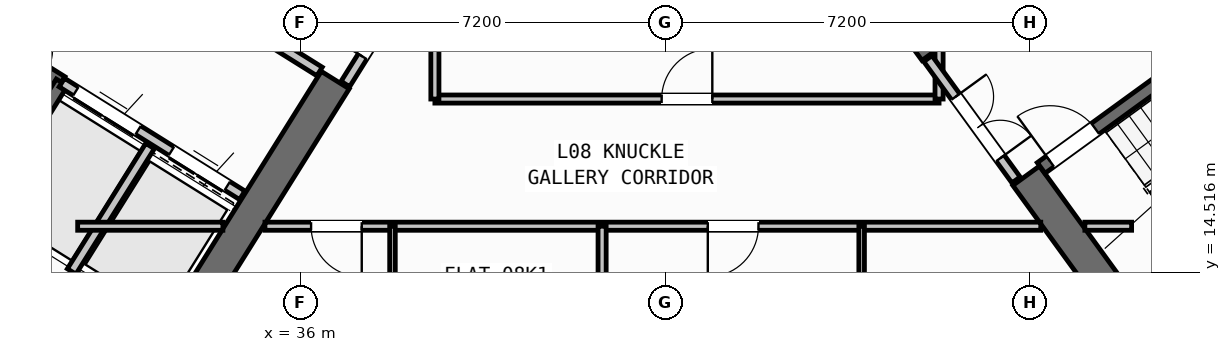
"""IFC4 building model, lengths in metres.
Left out: names, types, materials, properties, quantities, classifications, styles, units other than length and angle.
Written with IfcOpenShell. Run it as: python <this file> out.ifc"""

import sys

from ifc_helpers import new_model, si_unit, direction, frame, frame_2d, origin, place, context, subcontext, project, spatial, rectangle, extrude, source, transform, mapped, element, fill, save


model = new_model("IFC4")
c1 = context("Model", 3, precision=1e-05, world=origin(), true_north=direction((0.0, 1.0)))
c2 = subcontext(c1, "Body", "Model", "MODEL_VIEW")
j1 = project(units=[si_unit("LENGTHUNIT", "METRE"), si_unit("PLANEANGLEUNIT", "RADIAN")], contexts=[c1])
p1 = place(None, origin())
s1 = spatial("IfcSite", under=j1, at=p1, CompositionType="ELEMENT")
p2 = place(p1, origin())
s2 = spatial("IfcBuilding", under=s1, at=p2, CompositionType="ELEMENT")
p3 = place(p2, frame((0.0, 0.0, 34.8)))
s3 = spatial("IfcBuildingStorey", under=s2, at=p3, CompositionType="ELEMENT", Elevation=34.8)
p4 = place(p3, frame((33.409, 12.45, 0.0), z_axis=(0.0, 0.0, 1.0), x_axis=(-0.848051132073, 0.529914405721, 0.0)))
e1 = element("IfcWall", 1, at=p4, inside=s3, PredefinedType="SHEAR", context=c2, shape_type="SweptSolid", body=[
    extrude(rectangle(XDim=13.24, YDim=0.65, at=frame_2d((6.62, 0.0))), origin(), (0.0, 0.0, 1.0), 3.35),
])
p5 = place(p3, frame((36.683, 18.304, 0.0), z_axis=(0.0, 0.0, 1.0), x_axis=(-0.529899109053, -0.848060690178, 0.0)))
e2 = element("IfcWall", 2, at=p5, inside=s3, PredefinedType="SHEAR", context=c2, shape_type="SweptSolid", body=[
    extrude(rectangle(XDim=6.375, YDim=0.65, at=frame_2d((3.188, 0.0))), origin(), (0.0, 0.0, 1.0), 3.35),
])
p6 = place(p3, frame((52.318, 13.11, 0.0), z_axis=(0.0, 0.0, 1.0), x_axis=(0.809019445368, 0.587781878776, 0.0)))
e3 = element("IfcWall", 3, at=p6, inside=s3, PredefinedType="SHEAR", context=c2, shape_type="SweptSolid", body=[
    extrude(rectangle(XDim=12.44, YDim=0.65, at=frame_2d((6.22, 0.0))), origin(), (0.0, 0.0, 1.0), 3.35),
])
p7 = place(p3, frame((52.39, 13.564, 0.0), z_axis=(0.0, 0.0, 1.0), x_axis=(-0.58779688989, 0.809008539037, 0.0)))
e4 = element("IfcWall", 4, at=p7, inside=s3, PredefinedType="SHEAR", context=c2, shape_type="SweptSolid", body=[
    extrude(rectangle(XDim=3.525, YDim=0.65, at=frame_2d((1.763, 0.0))), origin(), (0.0, 0.0, 1.0), 3.35),
])
p8 = place(p3, frame((48.526, 18.884, 0.0), z_axis=(0.0, 0.0, 1.0), x_axis=(-0.58777996584, 0.809020835181, 0.0)))
e5 = element("IfcWall", 5, at=p8, inside=s3, PredefinedType="SHEAR", context=c2, shape_type="SweptSolid", body=[
    extrude(rectangle(XDim=6.375, YDim=0.65, at=frame_2d((3.188, 0.0))), origin(), (0.0, 0.0, 1.0), 3.35),
])
p9 = place(p3, frame((31.28, 18.261, 0.0), z_axis=(0.0, 0.0, 1.0), x_axis=(-0.848051618787, 0.529913626805, 0.0)))
e6 = element("IfcWall", 6, at=p9, inside=s3, PredefinedType="SHEAR", context=c2, shape_type="SweptSolid", body=[
    extrude(rectangle(XDim=7.46, YDim=0.26, at=frame_2d((3.73, 0.0))), origin(), (0.0, 0.0, 1.0), 3.35),
])
p10 = place(p9, frame((0.36, 0.0, 0.0)))
e7 = element("IfcOpeningElement", 7, at=p10, cuts=e6, PredefinedType="OPENING", context=c2, shape_type="SweptSolid", body=[
    extrude(rectangle(XDim=0.86, YDim=2.05, at=frame_2d((0.43, 1.025))), frame((0.0, 0.14, 0.0), z_axis=(0.0, -1.0, 0.0), x_axis=(1.0, 0.0, 0.0)), (0.0, 0.0, 1.0), 0.28),
])
p11 = place(p3, frame((31.288, 18.256, 0.0), z_axis=(0.0, 0.0, 1.0), x_axis=(-0.529943379326, -0.848033026897, 0.0)))
e8 = element("IfcWall", 8, at=p11, inside=s3, PredefinedType="SHEAR", context=c2, shape_type="SweptSolid", body=[
    extrude(rectangle(XDim=3.16, YDim=0.26, at=frame_2d((1.58, 0.0))), origin(), (0.0, 0.0, 1.0), 3.35),
])
p12 = place(p3, frame((34.848, 16.031, 0.0), z_axis=(0.0, 0.0, 1.0), x_axis=(-0.848044042236, 0.529925751807, 0.0)))
e9 = element("IfcWall", 9, at=p12, inside=s3, PredefinedType="STANDARD", context=c2, shape_type="SweptSolid", body=[
    extrude(rectangle(XDim=4.198, YDim=0.2, at=frame_2d((2.099, 0.0))), origin(), (0.0, 0.0, 1.0), 3.34),
])
p13 = place(p12, frame((0.348, 0.0, 0.0)))
e10 = element("IfcOpeningElement", 10, at=p13, cuts=e9, PredefinedType="OPENING", context=c2, shape_type="SweptSolid", body=[
    extrude(rectangle(XDim=1.3, YDim=2.2, at=frame_2d((0.65, 1.1))), frame((0.0, 0.11, 0.0), z_axis=(0.0, -1.0, 0.0), x_axis=(1.0, 0.0, 0.0)), (0.0, 0.0, 1.0), 0.22),
])
p14 = place(p12, frame((2.423, 0.0, 0.0)))
e11 = element("IfcOpeningElement", 11, at=p14, cuts=e9, PredefinedType="OPENING", context=c2, shape_type="SweptSolid", body=[
    extrude(rectangle(XDim=1.45, YDim=2.25, at=frame_2d((0.725, 1.125))), frame((0.0, 0.11, 0.0), z_axis=(0.0, -1.0, 0.0), x_axis=(1.0, 0.0, 0.0)), (0.0, 0.0, 1.0), 0.22),
])
p15 = place(p3, frame((36.374, 18.474, 0.0), z_axis=(0.0, 0.0, 1.0), x_axis=(-0.848051071577, 0.529914502535, 0.0)))
e12 = element("IfcWall", 12, at=p15, inside=s3, PredefinedType="STANDARD", context=c2, shape_type="SweptSolid", body=[
    extrude(rectangle(XDim=5.718, YDim=0.2, at=frame_2d((2.859, 0.0))), origin(), (0.0, 0.0, 1.0), 3.34),
])
p16 = place(p15, frame((2.498, 0.0, 0.0)))
e13 = element("IfcOpeningElement", 13, at=p16, cuts=e12, PredefinedType="OPENING", context=c2, shape_type="SweptSolid", body=[
    extrude(rectangle(XDim=1.15, YDim=2.1, at=frame_2d((0.575, 1.05))), frame((0.0, 0.11, 0.0), z_axis=(0.0, -1.0, 0.0), x_axis=(1.0, 0.0, 0.0)), (0.0, 0.0, 1.0), 0.22),
])
p17 = place(p3, frame((33.029, 17.003, 0.0), z_axis=(0.0, 0.0, 1.0), x_axis=(-0.529916267533, -0.848049968695, 0.0)))
e14 = element("IfcWall", 14, at=p17, inside=s3, PredefinedType="STANDARD", context=c2, shape_type="SweptSolid", body=[
    extrude(rectangle(XDim=2.92, YDim=0.2, at=frame_2d((1.46, 0.0))), origin(), (0.0, 0.0, 1.0), 3.34),
])
p18 = place(p3, frame((52.472, 14.013, 0.0), z_axis=(0.0, 0.0, 1.0), x_axis=(0.809028366311, 0.587769599847, 0.0)))
e15 = element("IfcWall", 15, at=p18, inside=s3, PredefinedType="SHEAR", context=c2, shape_type="SweptSolid", body=[
    extrude(rectangle(XDim=7.33, YDim=0.26, at=frame_2d((3.665, 0.0))), origin(), (0.0, 0.0, 1.0), 3.35),
])
p19 = place(p3, frame((50.615, 16.57, 0.0), z_axis=(0.0, 0.0, 1.0), x_axis=(0.809028366311, 0.587769599847, 0.0)))
e16 = element("IfcWall", 16, at=p19, inside=s3, PredefinedType="SHEAR", context=c2, shape_type="SweptSolid", body=[
    extrude(rectangle(XDim=7.33, YDim=0.26, at=frame_2d((3.665, 0.0))), origin(), (0.0, 0.0, 1.0), 3.35),
])
p20 = place(p19, frame((0.22, 0.0, 0.0)))
e17 = element("IfcOpeningElement", 17, at=p20, cuts=e16, PredefinedType="OPENING", context=c2, shape_type="SweptSolid", body=[
    extrude(rectangle(XDim=1.1, YDim=2.1, at=frame_2d((0.55, 1.05))), frame((0.0, 0.14, 0.0), z_axis=(0.0, -1.0, 0.0), x_axis=(1.0, 0.0, 0.0)), (0.0, 0.0, 1.0), 0.28),
])
p21 = place(p3, frame((32.164, 10.374, 0.0), z_axis=(0.0, 0.0, 1.0), x_axis=(-0.848044107957, 0.529925646633, 0.0)))
e18 = element("IfcWall", 18, at=p21, inside=s3, PredefinedType="PARTITIONING", context=c2, shape_type="SweptSolid", body=[
    extrude(rectangle(XDim=15.57, YDim=0.16, at=frame_2d((7.785, 0.0))), origin(), (0.0, 0.0, 1.0), 3.34),
])
p22 = place(p21, frame((10.83, 0.0, 0.0)))
e19 = element("IfcOpeningElement", 19, at=p22, cuts=e18, PredefinedType="OPENING", context=c2, shape_type="SweptSolid", body=[
    extrude(rectangle(XDim=1.0, YDim=2.1, at=frame_2d((0.5, 1.05))), frame((0.0, 0.09, 0.0), z_axis=(0.0, -1.0, 0.0), x_axis=(1.0, 0.0, 0.0)), (0.0, 0.0, 1.0), 0.18),
])
p23 = place(p3, frame((38.451, 20.737, 0.0), z_axis=(0.0, 0.0, 1.0), x_axis=(-0.529924799939, -0.848044637038, 0.0)))
e20 = element("IfcWall", 20, at=p23, inside=s3, PredefinedType="STANDARD", context=c2, shape_type="SweptSolid", body=[
    extrude(rectangle(XDim=2.96, YDim=0.2, at=frame_2d((1.48, 0.0))), origin(), (0.0, 0.0, 1.0), 3.34),
])
p24 = place(p23, frame((1.46, 0.0, 0.0)))
e21 = element("IfcOpeningElement", 21, at=p24, cuts=e20, PredefinedType="OPENING", context=c2, shape_type="SweptSolid", body=[
    extrude(rectangle(XDim=0.86, YDim=2.05, at=frame_2d((0.43, 1.025))), frame((0.0, 0.11, 0.0), z_axis=(0.0, -1.0, 0.0), x_axis=(1.0, 0.0, 0.0)), (0.0, 0.0, 1.0), 0.22),
])
p25 = place(p3, frame((31.6, 15.42, 0.0), z_axis=(0.0, 0.0, 1.0), x_axis=(1.0, 0.0, 0.0)))
e22 = element("IfcWall", 22, at=p25, inside=s3, PredefinedType="PARTITIONING", context=c2, shape_type="SweptSolid", body=[
    extrude(rectangle(XDim=2.866, YDim=0.16, at=frame_2d((1.433, 0.0))), origin(), (0.0, 0.0, 1.0), 3.34),
])
p26 = place(p3, frame((35.296, 15.42, 0.0), z_axis=(0.0, 0.0, 1.0), x_axis=(1.0, 0.0, 0.0)))
e23 = element("IfcWall", 23, at=p26, inside=s3, PredefinedType="PARTITIONING", context=c2, shape_type="SweptSolid", body=[
    extrude(rectangle(XDim=15.311, YDim=0.16, at=frame_2d((7.655, 0.0))), origin(), (0.0, 0.0, 1.0), 3.34),
])
p27 = place(p26, frame((0.91, 0.0, 0.0)))
e24 = element("IfcOpeningElement", 24, at=p27, cuts=e23, PredefinedType="OPENING", context=c2, shape_type="SweptSolid", body=[
    extrude(rectangle(XDim=1.0, YDim=2.1, at=frame_2d((0.5, 1.05))), frame((0.0, 0.09, 0.0), z_axis=(0.0, -1.0, 0.0), x_axis=(1.0, 0.0, 0.0)), (0.0, 0.0, 1.0), 0.18),
])
p28 = place(p26, frame((8.74, 0.0, 0.0)))
e25 = element("IfcOpeningElement", 25, at=p28, cuts=e23, PredefinedType="OPENING", context=c2, shape_type="SweptSolid", body=[
    extrude(rectangle(XDim=1.0, YDim=2.1, at=frame_2d((0.5, 1.05))), frame((0.0, 0.09, 0.0), z_axis=(0.0, -1.0, 0.0), x_axis=(1.0, 0.0, 0.0)), (0.0, 0.0, 1.0), 0.18),
])
p29 = place(p3, frame((51.477, 15.42, 0.0), z_axis=(0.0, 0.0, 1.0), x_axis=(1.0, 0.0, 0.0)))
e26 = element("IfcWall", 26, at=p29, inside=s3, PredefinedType="PARTITIONING", context=c2, shape_type="SweptSolid", body=[
    extrude(rectangle(XDim=0.923, YDim=0.16, at=frame_2d((0.461, 0.0))), origin(), (0.0, 0.0, 1.0), 3.34),
])
p30 = place(p3, frame((38.65, 17.93, 0.0), z_axis=(0.0, 0.0, 1.0), x_axis=(1.0, 0.0, 0.0)))
e27 = element("IfcWall", 27, at=p30, inside=s3, PredefinedType="PARTITIONING", context=c2, shape_type="SweptSolid", body=[
    extrude(rectangle(XDim=9.95, YDim=0.16, at=frame_2d((4.975, 0.0))), origin(), (0.0, 0.0, 1.0), 3.34),
])
p31 = place(p30, frame((4.475, 0.0, 0.0)))
e28 = element("IfcOpeningElement", 28, at=p31, cuts=e27, PredefinedType="OPENING", context=c2, shape_type="SweptSolid", body=[
    extrude(rectangle(XDim=1.0, YDim=2.1, at=frame_2d((0.5, 1.05))), frame((0.0, 0.09, 0.0), z_axis=(0.0, -1.0, 0.0), x_axis=(1.0, 0.0, 0.0)), (0.0, 0.0, 1.0), 0.18),
])
p32 = place(p3, frame((38.65, 17.93, 0.0), z_axis=(0.0, 0.0, 1.0), x_axis=(0.0, 1.0, 0.0)))
e29 = element("IfcWall", 29, at=p32, inside=s3, PredefinedType="PARTITIONING", context=c2, shape_type="SweptSolid", body=[
    extrude(rectangle(XDim=2.857, YDim=0.16, at=frame_2d((1.428, 0.0))), origin(), (0.0, 0.0, 1.0), 3.34),
])
p33 = place(p3, frame((48.6, 17.93, 0.0), z_axis=(0.0, 0.0, 1.0), x_axis=(0.0, 1.0, 0.0)))
e30 = element("IfcWall", 30, at=p33, inside=s3, PredefinedType="PARTITIONING", context=c2, shape_type="SweptSolid", body=[
    extrude(rectangle(XDim=0.993, YDim=0.16, at=frame_2d((0.496, 0.0))), origin(), (0.0, 0.0, 1.0), 3.34),
])
p34 = place(p3, frame((50.119, 16.333, 0.0), z_axis=(0.0, 0.0, 1.0), x_axis=(-0.587749856981, 0.809042709391, 0.0)))
e31 = element("IfcWall", 31, at=p34, inside=s3, PredefinedType="STANDARD", context=c2, shape_type="SweptSolid", body=[
    extrude(rectangle(XDim=2.96, YDim=0.2, at=frame_2d((1.48, 0.0))), origin(), (0.0, 0.0, 1.0), 3.34),
])
p35 = place(p34, frame((0.53, 0.0, 0.0)))
e32 = element("IfcOpeningElement", 32, at=p35, cuts=e31, PredefinedType="OPENING", context=c2, shape_type="SweptSolid", body=[
    extrude(rectangle(XDim=1.5, YDim=2.15, at=frame_2d((0.75, 1.075))), frame((0.0, 0.11, 0.0), z_axis=(0.0, -1.0, 0.0), x_axis=(1.0, 0.0, 0.0)), (0.0, 0.0, 1.0), 0.22),
])
p36 = place(p3, frame((41.95, 1.96, 0.0), z_axis=(0.0, 0.0, 1.0), x_axis=(0.0, 1.0, 0.0)))
e33 = element("IfcWall", 33, at=p36, inside=s3, PredefinedType="PARTITIONING", context=c2, shape_type="SweptSolid", body=[
    extrude(rectangle(XDim=13.46, YDim=0.16, at=frame_2d((6.73, 0.0))), origin(), (0.0, 0.0, 1.0), 3.34),
])
p37 = place(p3, frame((37.813, 1.96, 0.0), z_axis=(0.0, 0.0, 1.0), x_axis=(0.0, 1.0, 0.0)))
e34 = element("IfcWall", 34, at=p37, inside=s3, PredefinedType="PARTITIONING", context=c2, shape_type="SweptSolid", body=[
    extrude(rectangle(XDim=13.46, YDim=0.11, at=frame_2d((6.73, 0.0))), origin(), (0.0, 0.0, 1.0), 3.34),
])
p38 = place(p37, frame((5.5, 0.0, 0.0)))
e35 = element("IfcOpeningElement", 35, at=p38, cuts=e34, PredefinedType="OPENING", context=c2, shape_type="SweptSolid", body=[
    extrude(rectangle(XDim=0.92, YDim=2.08, at=frame_2d((0.46, 1.04))), frame((0.0, 0.065, 0.0), z_axis=(0.0, -1.0, 0.0), x_axis=(1.0, 0.0, 0.0)), (0.0, 0.0, 1.0), 0.13),
])
p39 = place(p37, frame((10.67, 0.0, 0.0)))
e36 = element("IfcOpeningElement", 36, at=p39, cuts=e34, PredefinedType="OPENING", context=c2, shape_type="SweptSolid", body=[
    extrude(rectangle(XDim=0.88, YDim=2.08, at=frame_2d((0.44, 1.04))), frame((0.0, 0.065, 0.0), z_axis=(0.0, -1.0, 0.0), x_axis=(1.0, 0.0, 0.0)), (0.0, 0.0, 1.0), 0.13),
])
p40 = place(p3, frame((47.072, 1.96, 0.0), z_axis=(0.0, 0.0, 1.0), x_axis=(0.0, 1.0, 0.0)))
e37 = element("IfcWall", 37, at=p40, inside=s3, PredefinedType="PARTITIONING", context=c2, shape_type="SweptSolid", body=[
    extrude(rectangle(XDim=13.46, YDim=0.11, at=frame_2d((6.73, 0.0))), origin(), (0.0, 0.0, 1.0), 3.34),
])
p41 = place(p40, frame((6.6, 0.0, 0.0)))
e38 = element("IfcOpeningElement", 38, at=p41, cuts=e37, PredefinedType="OPENING", context=c2, shape_type="SweptSolid", body=[
    extrude(rectangle(XDim=0.92, YDim=2.08, at=frame_2d((0.46, 1.04))), frame((0.0, 0.065, 0.0), z_axis=(0.0, -1.0, 0.0), x_axis=(1.0, 0.0, 0.0)), (0.0, 0.0, 1.0), 0.13),
])
p42 = place(p40, frame((11.32, 0.0, 0.0)))
e39 = element("IfcOpeningElement", 39, at=p42, cuts=e37, PredefinedType="OPENING", context=c2, shape_type="SweptSolid", body=[
    extrude(rectangle(XDim=0.88, YDim=2.08, at=frame_2d((0.44, 1.04))), frame((0.0, 0.065, 0.0), z_axis=(0.0, -1.0, 0.0), x_axis=(1.0, 0.0, 0.0)), (0.0, 0.0, 1.0), 0.13),
])
m1 = source(origin(), c2, "Body", "SweptSolid", [
    extrude(rectangle(XDim=1.3, YDim=2.2, at=frame_2d((0.65, 1.1))), frame((0.0, 0.025, 0.0), z_axis=(0.0, -1.0, 0.0), x_axis=(1.0, 0.0, 0.0)), (0.0, 0.0, 1.0), 0.05),
])
p43 = place(p13, origin())
e40 = element("IfcDoor", 40, at=p43, inside=s3, OperationType="DOUBLE_DOOR_SLIDING", PredefinedType="DOOR", context=c2, shape_type="MappedRepresentation", body=[
    mapped(m1, transform((0.0, 0.0, 0.0), scale=1.0)),
])
fill(e10, e40)
m2 = source(origin(), c2, "Body", "SweptSolid", [
    extrude(rectangle(XDim=1.45, YDim=2.25, at=frame_2d((0.725, 1.125))), frame((0.0, 0.025, 0.0), z_axis=(0.0, -1.0, 0.0), x_axis=(1.0, 0.0, 0.0)), (0.0, 0.0, 1.0), 0.05),
])
p44 = place(p14, origin())
e41 = element("IfcDoor", 41, at=p44, inside=s3, OperationType="DOUBLE_DOOR_SLIDING", PredefinedType="DOOR", context=c2, shape_type="MappedRepresentation", body=[
    mapped(m2, transform((0.0, 0.0, 0.0), scale=1.0)),
])
fill(e11, e41)
m3 = source(origin(), c2, "Body", "SweptSolid", [
    extrude(rectangle(XDim=1.1, YDim=2.1, at=frame_2d((0.55, 1.05))), frame((0.0, 0.025, 0.0), z_axis=(0.0, -1.0, 0.0), x_axis=(1.0, 0.0, 0.0)), (0.0, 0.0, 1.0), 0.05),
])
p45 = place(p20, origin())
e42 = element("IfcDoor", 42, at=p45, inside=s3, OperationType="SINGLE_SWING_LEFT", PredefinedType="DOOR", context=c2, shape_type="MappedRepresentation", body=[
    mapped(m3, transform((0.0, 0.0, 0.0), scale=1.0)),
])
fill(e17, e42)
m4 = source(origin(), c2, "Body", "SweptSolid", [
    extrude(rectangle(XDim=1.0, YDim=2.1, at=frame_2d((0.5, 1.05))), frame((0.0, 0.025, 0.0), z_axis=(0.0, -1.0, 0.0), x_axis=(1.0, 0.0, 0.0)), (0.0, 0.0, 1.0), 0.05),
])
p46 = place(p31, origin())
e43 = element("IfcDoor", 43, at=p46, inside=s3, OperationType="SINGLE_SWING_RIGHT", PredefinedType="DOOR", context=c2, shape_type="MappedRepresentation", body=[
    mapped(m4, transform((0.0, 0.0, 0.0), scale=1.0)),
])
fill(e28, e43)
m5 = source(origin(), c2, "Body", "SweptSolid", [
    extrude(rectangle(XDim=0.86, YDim=2.05, at=frame_2d((0.43, 1.025))), frame((0.0, 0.025, 0.0), z_axis=(0.0, -1.0, 0.0), x_axis=(1.0, 0.0, 0.0)), (0.0, 0.0, 1.0), 0.05),
])
p47 = place(p24, frame((0.86, 0.0, 0.0), z_axis=(0.0, 0.0, 1.0), x_axis=(-1.0, 0.0, 0.0)))
e44 = element("IfcDoor", 44, at=p47, inside=s3, OperationType="SINGLE_SWING_LEFT", PredefinedType="DOOR", context=c2, shape_type="MappedRepresentation", body=[
    mapped(m5, transform((0.0, 0.0, 0.0), scale=1.0)),
])
fill(e21, e44)
m6 = source(origin(), c2, "Body", "SweptSolid", [
    extrude(rectangle(XDim=1.5, YDim=2.15, at=frame_2d((0.75, 1.075))), frame((0.0, 0.025, 0.0), z_axis=(0.0, -1.0, 0.0), x_axis=(1.0, 0.0, 0.0)), (0.0, 0.0, 1.0), 0.05),
])
p48 = place(p35, frame((1.5, 0.0, 0.0), z_axis=(0.0, 0.0, 1.0), x_axis=(-1.0, 0.0, 0.0)))
e45 = element("IfcDoor", 45, at=p48, inside=s3, OperationType="DOUBLE_DOOR_SINGLE_SWING", PredefinedType="DOOR", context=c2, shape_type="MappedRepresentation", body=[
    mapped(m6, transform((0.0, 0.0, 0.0), scale=1.0)),
])
fill(e32, e45)
p49 = place(p27, frame((1.0, 0.0, 0.0), z_axis=(0.0, 0.0, 1.0), x_axis=(-1.0, 0.0, 0.0)))
e46 = element("IfcDoor", 46, at=p49, inside=s3, OperationType="SINGLE_SWING_LEFT", PredefinedType="DOOR", context=c2, shape_type="MappedRepresentation", body=[
    mapped(m4, transform((0.0, 0.0, 0.0), scale=1.0)),
])
fill(e24, e46)
p50 = place(p28, frame((1.0, 0.0, 0.0), z_axis=(0.0, 0.0, 1.0), x_axis=(-1.0, 0.0, 0.0)))
e47 = element("IfcDoor", 47, at=p50, inside=s3, OperationType="SINGLE_SWING_RIGHT", PredefinedType="DOOR", context=c2, shape_type="MappedRepresentation", body=[
    mapped(m4, transform((0.0, 0.0, 0.0), scale=1.0)),
])
fill(e25, e47)
save(model, sys.argv[1])
